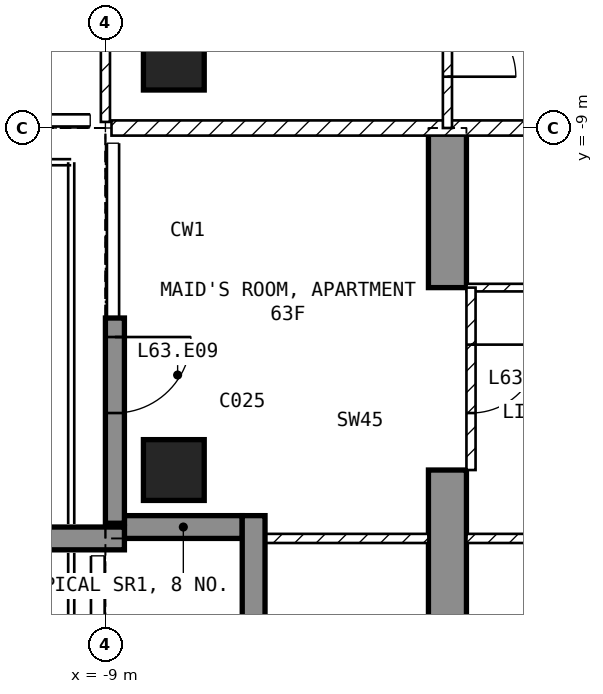
"""IFC4 building model, lengths in metres.
Left out: names, types, materials, properties, quantities, classifications, styles, units other than length and angle.
Written with IfcOpenShell. Run it as: python <this file> out.ifc"""

import sys

from ifc_helpers import new_model, si_unit, direction, frame, frame_2d, origin, origin_2d, place, context, subcontext, project, spatial, polyline, rectangle, outline, extrude, element, fill, save


model = new_model("IFC4")
c1 = context("Model", 3, precision=1e-05, world=origin(), true_north=direction((0.0, 1.0)))
c2 = subcontext(c1, "Body", "Model", "MODEL_VIEW")
j1 = project(units=[si_unit("LENGTHUNIT", "METRE"), si_unit("PLANEANGLEUNIT", "RADIAN")], contexts=[c1])
p1 = place(None, origin())
s1 = spatial("IfcSite", under=j1, at=p1, CompositionType="ELEMENT")
p2 = place(p1, origin())
s2 = spatial("IfcBuilding", under=s1, at=p2, CompositionType="ELEMENT")
p3 = place(p2, frame((0.0, 0.0, 250.0)))
s3 = spatial("IfcBuildingStorey", under=s2, at=p3, CompositionType="ELEMENT", Elevation=250.0)
for number, where, z_axis, x_axis in (
    (1, (-8.1, -13.5, -0.25), (0.0, 0.0, 1.0), (1.0, 0.0, 0.0)),
    (2, (-8.1, -8.1, -0.25), (0.0, 0.0, 1.0), (1.0, 0.0, 0.0)),
):
    element("IfcColumn", number, at=place(p3, frame(where, z_axis=z_axis, x_axis=x_axis)), inside=s3, PredefinedType="COLUMN", context=c2, shape_type="SweptSolid", body=[
        extrude(rectangle(XDim=0.8, YDim=0.8, at=origin_2d()), origin(), (0.0, 0.0, 1.0), 3.5),
    ])
p4 = place(p3, frame((-4.75, -16.7, -0.25), z_axis=(1.0, 0.0, 0.0), x_axis=(0.0, 1.0, 0.0)))
e3 = element("IfcWall", 3, at=p4, inside=s3, PredefinedType="SHEAR", context=c2, shape_type="SweptSolid", body=[
    extrude(outline(polyline([(0.0, 0.0), (3.2, 0.0), (3.2, 2.65), (5.6, 2.65), (5.6, 0.0), (7.7, 0.0), (7.7, 3.5), (0.0, 3.5), (0.0, 0.0)])), origin(), (0.0, 0.0, 1.0), 0.5),
])
p5 = place(p3, frame((-8.875, -11.5, 0.0), z_axis=(0.0, 0.0, 1.0), x_axis=(0.0, -1.0, 0.0)))
e4 = element("IfcWall", 4, at=p5, inside=s3, PredefinedType="SOLIDWALL", context=c2, shape_type="SweptSolid", body=[
    extrude(rectangle(XDim=2.7, YDim=0.25, at=frame_2d((1.35, 0.0))), origin(), (0.0, 0.0, 1.0), 3.25),
])
p6 = place(p5, frame((0.25, 0.0, 0.0)))
e5 = element("IfcOpeningElement", 5, at=p6, cuts=e4, PredefinedType="OPENING", context=c2, shape_type="SweptSolid", body=[
    extrude(rectangle(XDim=1.0, YDim=2.4, at=frame_2d((0.5, 1.2))), frame((0.0, 0.135, 0.0), z_axis=(0.0, -1.0, 0.0), x_axis=(1.0, 0.0, 0.0)), (0.0, 0.0, 1.0), 0.27),
])
p7 = place(p3, frame((-8.75, -14.25, 0.0), z_axis=(0.0, 0.0, 1.0), x_axis=(1.0, 0.0, 0.0)))
e6 = element("IfcWall", 6, at=p7, inside=s3, PredefinedType="SOLIDWALL", context=c2, shape_type="SweptSolid", body=[
    extrude(rectangle(XDim=1.55, YDim=0.3, at=frame_2d((0.775, 0.0))), origin(), (0.0, 0.0, 1.0), 3.25),
])
p8 = place(p3, frame((-7.05, -14.1, 0.0), z_axis=(0.0, 0.0, 1.0), x_axis=(0.0, -1.0, 0.0)))
e7 = element("IfcWall", 7, at=p8, inside=s3, PredefinedType="SOLIDWALL", context=c2, shape_type="SweptSolid", body=[
    extrude(rectangle(XDim=1.8, YDim=0.3, at=frame_2d((0.9, 0.0))), origin(), (0.0, 0.0, 1.0), 3.25),
])
p9 = place(p3, frame((-8.75, -14.4, 0.0), z_axis=(0.0, 0.0, 1.0), x_axis=(-1.0, 0.0, 0.0)))
e8 = element("IfcWall", 8, at=p9, inside=s3, PredefinedType="SOLIDWALL", context=c2, shape_type="SweptSolid", body=[
    extrude(rectangle(XDim=2.95, YDim=0.3, at=frame_2d((1.475, 0.0))), origin(), (0.0, 0.0, 1.0), 3.25),
])
p10 = place(p3, frame((8.92, -9.0, 0.0), z_axis=(0.0, 0.0, 1.0), x_axis=(-1.0, 0.0, 0.0)))
e9 = element("IfcWall", 9, at=p10, inside=s3, PredefinedType="PARTITIONING", context=c2, shape_type="SweptSolid", body=[
    extrude(rectangle(XDim=17.84, YDim=0.2, at=frame_2d((8.92, 0.0))), origin(), (0.0, 0.0, 1.0), 3.25),
])
p11 = place(p10, frame((8.42, 0.0, 0.0)))
e10 = element("IfcOpeningElement", 10, at=p11, cuts=e9, PredefinedType="OPENING", context=c2, shape_type="SweptSolid", body=[
    extrude(rectangle(XDim=1.0, YDim=2.1, at=frame_2d((0.5, 1.05))), frame((0.0, 0.11, 0.0), z_axis=(0.0, -1.0, 0.0), x_axis=(1.0, 0.0, 0.0)), (0.0, 0.0, 1.0), 0.22),
])
p12 = place(p3, frame((-9.0, -1.3, 0.0), z_axis=(0.0, 0.0, 1.0), x_axis=(0.0, -1.0, 0.0)))
e11 = element("IfcWall", 11, at=p12, inside=s3, PredefinedType="PARTITIONING", context=c2, shape_type="SweptSolid", body=[
    extrude(rectangle(XDim=7.62, YDim=0.12, at=frame_2d((3.81, 0.0))), origin(), (0.0, 0.0, 1.0), 3.25),
])
p13 = place(p12, frame((1.45, 0.0, 0.0)))
e12 = element("IfcOpeningElement", 12, at=p13, cuts=e11, PredefinedType="OPENING", context=c2, shape_type="SweptSolid", body=[
    extrude(rectangle(XDim=0.9, YDim=2.1, at=frame_2d((0.45, 1.05))), frame((0.0, 0.07, 0.0), z_axis=(0.0, -1.0, 0.0), x_axis=(1.0, 0.0, 0.0)), (0.0, 0.0, 1.0), 0.14),
])
p14 = place(p3, frame((-4.5, -6.75, 0.0), z_axis=(0.0, 0.0, 1.0), x_axis=(0.0, -1.0, 0.0)))
e13 = element("IfcWall", 13, at=p14, inside=s3, PredefinedType="PARTITIONING", context=c2, shape_type="SweptSolid", body=[
    extrude(rectangle(XDim=2.25, YDim=0.12, at=frame_2d((1.125, 0.0))), origin(), (0.0, 0.0, 1.0), 3.25),
])
p15 = place(p14, frame((0.675, 0.0, 0.0)))
e14 = element("IfcOpeningElement", 14, at=p15, cuts=e13, PredefinedType="OPENING", context=c2, shape_type="SweptSolid", body=[
    extrude(rectangle(XDim=0.9, YDim=2.1, at=frame_2d((0.45, 1.05))), frame((0.0, 0.07, 0.0), z_axis=(0.0, -1.0, 0.0), x_axis=(1.0, 0.0, 0.0)), (0.0, 0.0, 1.0), 0.14),
])
p16 = place(p3, frame((-2.1, -11.1, 0.0), z_axis=(0.0, 0.0, 1.0), x_axis=(-1.0, 0.0, 0.0)))
e15 = element("IfcWall", 15, at=p16, inside=s3, PredefinedType="PARTITIONING", context=c2, shape_type="SweptSolid", body=[
    extrude(rectangle(XDim=2.15, YDim=0.1, at=frame_2d((1.075, 0.0))), origin(), (0.0, 0.0, 1.0), 3.25),
])
p17 = place(p3, frame((4.25, -14.4, 0.0), z_axis=(0.0, 0.0, 1.0), x_axis=(-1.0, 0.0, 0.0)))
e16 = element("IfcWall", 16, at=p17, inside=s3, PredefinedType="PARTITIONING", context=c2, shape_type="SweptSolid", body=[
    extrude(rectangle(XDim=8.5, YDim=0.12, at=frame_2d((4.25, 0.0))), origin(), (0.0, 0.0, 1.0), 3.25),
])
p18 = place(p17, frame((5.675, 0.0, 0.0)))
e17 = element("IfcOpeningElement", 17, at=p18, cuts=e16, PredefinedType="OPENING", context=c2, shape_type="SweptSolid", body=[
    extrude(rectangle(XDim=0.9, YDim=2.1, at=frame_2d((0.45, 1.05))), frame((0.0, 0.07, 0.0), z_axis=(0.0, -1.0, 0.0), x_axis=(1.0, 0.0, 0.0)), (0.0, 0.0, 1.0), 0.14),
])
p19 = place(p3, frame((-4.75, -14.4, 0.0), z_axis=(0.0, 0.0, 1.0), x_axis=(-1.0, 0.0, 0.0)))
e18 = element("IfcWall", 18, at=p19, inside=s3, PredefinedType="PARTITIONING", context=c2, shape_type="SweptSolid", body=[
    extrude(rectangle(XDim=2.37, YDim=0.12, at=frame_2d((1.185, 0.0))), origin(), (0.0, 0.0, 1.0), 3.25),
])
p20 = place(p3, frame((-4.19, -11.1, 0.0), z_axis=(0.0, 0.0, 1.0), x_axis=(0.0, -1.0, 0.0)))
e19 = element("IfcWall", 19, at=p20, inside=s3, PredefinedType="PARTITIONING", context=c2, shape_type="SweptSolid", body=[
    extrude(rectangle(XDim=2.4, YDim=0.12, at=frame_2d((1.2, 0.0))), origin(), (0.0, 0.0, 1.0), 2.4),
])
p21 = place(p20, frame((0.75, 0.0, 0.0)))
e20 = element("IfcOpeningElement", 20, at=p21, cuts=e19, PredefinedType="OPENING", context=c2, shape_type="SweptSolid", body=[
    extrude(rectangle(XDim=0.9, YDim=2.1, at=frame_2d((0.45, 1.05))), frame((0.0, 0.07, 0.0), z_axis=(0.0, -1.0, 0.0), x_axis=(1.0, 0.0, 0.0)), (0.0, 0.0, 1.0), 0.14),
])
p22 = place(p6, origin())
e21 = element("IfcDoor", 21, at=p22, inside=s3, OperationType="SINGLE_SWING_LEFT", PredefinedType="DOOR", context=c2, shape_type="SweptSolid", body=[
    extrude(rectangle(XDim=1.0, YDim=2.4, at=frame_2d((0.5, 1.2))), frame((0.0, 0.025, 0.0), z_axis=(0.0, -1.0, 0.0), x_axis=(1.0, 0.0, 0.0)), (0.0, 0.0, 1.0), 0.05),
])
fill(e5, e21)
p23 = place(p15, origin())
e22 = element("IfcDoor", 22, at=p23, inside=s3, OperationType="SINGLE_SWING_RIGHT", PredefinedType="DOOR", context=c2, shape_type="SweptSolid", body=[
    extrude(rectangle(XDim=0.9, YDim=2.1, at=frame_2d((0.45, 1.05))), frame((0.0, 0.025, 0.0), z_axis=(0.0, -1.0, 0.0), x_axis=(1.0, 0.0, 0.0)), (0.0, 0.0, 1.0), 0.05),
])
fill(e14, e22)
p24 = place(p21, origin())
e23 = element("IfcDoor", 23, at=p24, inside=s3, OperationType="SINGLE_SWING_LEFT", PredefinedType="DOOR", context=c2, shape_type="SweptSolid", body=[
    extrude(rectangle(XDim=0.9, YDim=2.1, at=frame_2d((0.45, 1.05))), frame((0.0, 0.025, 0.0), z_axis=(0.0, -1.0, 0.0), x_axis=(1.0, 0.0, 0.0)), (0.0, 0.0, 1.0), 0.05),
])
fill(e20, e23)
save(model, sys.argv[1])
